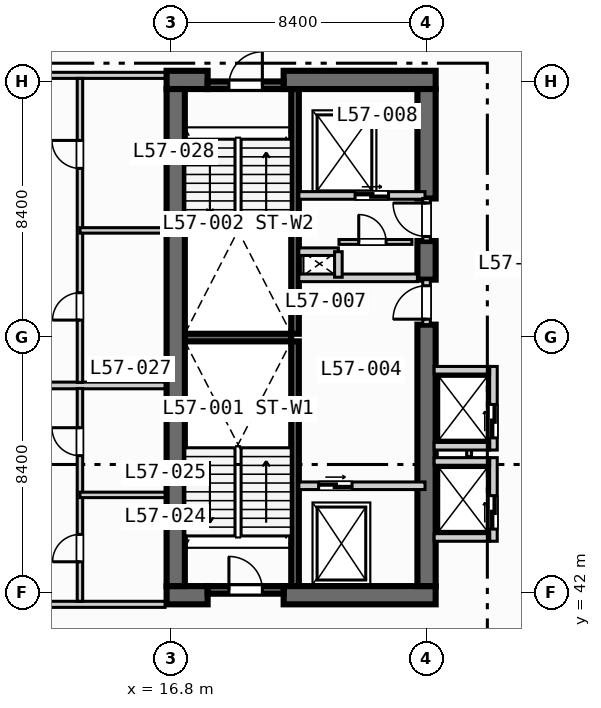
"""IFC4 building model, lengths in metres.
Left out: names, types, materials, properties, quantities, classifications, styles, units other than length and angle.
Written with IfcOpenShell. Run it as: python <this file> out.ifc"""

import sys

from ifc_helpers import new_model, si_unit, direction, frame, frame_2d, origin, place, context, subcontext, project, spatial, rectangle, extrude, element, fill, save


model = new_model("IFC4")
c1 = context("Model", 3, precision=1e-05, world=origin(), true_north=direction((0.0, 1.0)))
c2 = subcontext(c1, "Body", "Model", "MODEL_VIEW")
j1 = project(units=[si_unit("LENGTHUNIT", "METRE"), si_unit("PLANEANGLEUNIT", "RADIAN")], contexts=[c1])
p1 = place(None, origin())
s1 = spatial("IfcSite", under=j1, at=p1, CompositionType="ELEMENT")
p2 = place(p1, origin())
s2 = spatial("IfcBuilding", under=s1, at=p2, CompositionType="ELEMENT")
p3 = place(p2, frame((0.0, 0.0, 234.2)))
s3 = spatial("IfcBuildingStorey", under=s2, at=p3, CompositionType="ELEMENT", Elevation=234.2)
for number, where, z_axis, x_axis in (
    (1, (20.875, 42.2, 0.0), (0.0, 0.0, 1.0), (0.0, 1.0, 0.0)),
    (2, (20.875, 50.5, 0.0), (0.0, 0.0, 1.0), (0.0, 1.0, 0.0)),
):
    element("IfcWall", number, at=place(p3, frame(where, z_axis=z_axis, x_axis=x_axis)), inside=s3, PredefinedType="SOLIDWALL", context=c2, shape_type="SweptSolid", body=[
        extrude(rectangle(XDim=8.05, YDim=0.25, at=frame_2d((4.025, 0.0))), origin(), (0.0, 0.0, 1.0), 3.47),
    ])
p4 = place(p3, frame((17.25, 50.375, 0.0), z_axis=(0.0, 0.0, 1.0), x_axis=(1.0, 0.0, 0.0)))
e3 = element("IfcWall", 3, at=p4, inside=s3, PredefinedType="SOLIDWALL", context=c2, shape_type="SweptSolid", body=[
    extrude(rectangle(XDim=3.5, YDim=0.25, at=frame_2d((1.75, 0.0))), origin(), (0.0, 0.0, 1.0), 3.47),
])
p5 = place(p3, frame((16.65, 41.9, 0.0), z_axis=(0.0, 0.0, 1.0), x_axis=(1.0, 0.0, 0.0)))
e4 = element("IfcWall", 4, at=p5, inside=s3, PredefinedType="SHEAR", context=c2, shape_type="SweptSolid", body=[
    extrude(rectangle(XDim=1.35, YDim=0.6, at=frame_2d((0.675, 0.0))), origin(), (0.0, 0.0, 1.0), 3.47),
])
p6 = place(p3, frame((20.5, 41.9, 0.0), z_axis=(0.0, 0.0, 1.0), x_axis=(1.0, 0.0, 0.0)))
e5 = element("IfcWall", 5, at=p6, inside=s3, PredefinedType="SHEAR", context=c2, shape_type="SweptSolid", body=[
    extrude(rectangle(XDim=5.0, YDim=0.6, at=frame_2d((2.5, 0.0))), origin(), (0.0, 0.0, 1.0), 3.47),
])
p7 = place(p3, frame((16.65, 58.85, 0.0), z_axis=(0.0, 0.0, 1.0), x_axis=(1.0, 0.0, 0.0)))
e6 = element("IfcWall", 6, at=p7, inside=s3, PredefinedType="SHEAR", context=c2, shape_type="SweptSolid", body=[
    extrude(rectangle(XDim=1.35, YDim=0.6, at=frame_2d((0.675, 0.0))), origin(), (0.0, 0.0, 1.0), 3.47),
])
p8 = place(p3, frame((20.5, 58.85, 0.0), z_axis=(0.0, 0.0, 1.0), x_axis=(1.0, 0.0, 0.0)))
e7 = element("IfcWall", 7, at=p8, inside=s3, PredefinedType="SHEAR", context=c2, shape_type="SweptSolid", body=[
    extrude(rectangle(XDim=5.0, YDim=0.6, at=frame_2d((2.5, 0.0))), origin(), (0.0, 0.0, 1.0), 3.47),
])
p9 = place(p3, frame((16.95, 42.2, 0.0), z_axis=(0.0, 0.0, 1.0), x_axis=(0.0, 1.0, 0.0)))
e8 = element("IfcWall", 8, at=p9, inside=s3, PredefinedType="SHEAR", context=c2, shape_type="SweptSolid", body=[
    extrude(rectangle(XDim=16.35, YDim=0.6, at=frame_2d((8.175, 0.0))), origin(), (0.0, 0.0, 1.0), 3.47),
])
p10 = place(p3, frame((25.2, 42.2, 0.0), z_axis=(0.0, 0.0, 1.0), x_axis=(0.0, 1.0, 0.0)))
e9 = element("IfcWall", 9, at=p10, inside=s3, PredefinedType="SHEAR", context=c2, shape_type="SweptSolid", body=[
    extrude(rectangle(XDim=8.6, YDim=0.6, at=frame_2d((4.3, 0.0))), origin(), (0.0, 0.0, 1.0), 3.47),
])
p11 = place(p3, frame((25.2, 52.28, 0.0), z_axis=(0.0, 0.0, 1.0), x_axis=(0.0, 1.0, 0.0)))
e10 = element("IfcWall", 10, at=p11, inside=s3, PredefinedType="SHEAR", context=c2, shape_type="SweptSolid", body=[
    extrude(rectangle(XDim=1.27, YDim=0.6, at=frame_2d((0.635, 0.0))), origin(), (0.0, 0.0, 1.0), 3.47),
])
p12 = place(p3, frame((25.2, 54.95, 0.0), z_axis=(0.0, 0.0, 1.0), x_axis=(0.0, 1.0, 0.0)))
e11 = element("IfcWall", 11, at=p12, inside=s3, PredefinedType="SHEAR", context=c2, shape_type="SweptSolid", body=[
    extrude(rectangle(XDim=3.6, YDim=0.6, at=frame_2d((1.8, 0.0))), origin(), (0.0, 0.0, 1.0), 3.47),
])
p13 = place(p3, frame((18.0, 42.075, 0.0), z_axis=(0.0, 0.0, 1.0), x_axis=(1.0, 0.0, 0.0)))
e12 = element("IfcWall", 12, at=p13, inside=s3, PredefinedType="SOLIDWALL", context=c2, shape_type="SweptSolid", body=[
    extrude(rectangle(XDim=2.5, YDim=0.25, at=frame_2d((1.25, 0.0))), origin(), (0.0, 0.0, 1.0), 3.47),
])
p14 = place(p13, frame((0.7, 0.0, 0.0)))
e13 = element("IfcOpeningElement", 13, at=p14, cuts=e12, PredefinedType="OPENING", context=c2, shape_type="SweptSolid", body=[
    extrude(rectangle(XDim=1.1, YDim=2.15, at=frame_2d((0.55, 1.075))), frame((0.0, 0.135, 0.0), z_axis=(0.0, -1.0, 0.0), x_axis=(1.0, 0.0, 0.0)), (0.0, 0.0, 1.0), 0.27),
])
p15 = place(p3, frame((18.0, 58.675, 0.0), z_axis=(0.0, 0.0, 1.0), x_axis=(1.0, 0.0, 0.0)))
e14 = element("IfcWall", 14, at=p15, inside=s3, PredefinedType="SOLIDWALL", context=c2, shape_type="SweptSolid", body=[
    extrude(rectangle(XDim=2.5, YDim=0.25, at=frame_2d((1.25, 0.0))), origin(), (0.0, 0.0, 1.0), 3.47),
])
p16 = place(p15, frame((0.7, 0.0, 0.0)))
e15 = element("IfcOpeningElement", 15, at=p16, cuts=e14, PredefinedType="OPENING", context=c2, shape_type="SweptSolid", body=[
    extrude(rectangle(XDim=1.1, YDim=2.15, at=frame_2d((0.55, 1.075))), frame((0.0, 0.135, 0.0), z_axis=(0.0, -1.0, 0.0), x_axis=(1.0, 0.0, 0.0)), (0.0, 0.0, 1.0), 0.27),
])
p17 = place(p3, frame((21.0, 45.5, 0.0), z_axis=(0.0, 0.0, 1.0), x_axis=(1.0, 0.0, 0.0)))
e16 = element("IfcWall", 16, at=p17, inside=s3, PredefinedType="SOLIDWALL", context=c2, shape_type="SweptSolid", body=[
    extrude(rectangle(XDim=4.15, YDim=0.25, at=frame_2d((2.075, 0.0))), origin(), (0.0, 0.0, 1.0), 3.47),
])
p18 = place(p17, frame((0.65, 0.0, 0.0)))
e17 = element("IfcOpeningElement", 17, at=p18, cuts=e16, PredefinedType="OPENING", context=c2, shape_type="SweptSolid", body=[
    extrude(rectangle(XDim=1.1, YDim=2.15, at=frame_2d((0.55, 1.075))), frame((0.0, 0.135, 0.0), z_axis=(0.0, -1.0, 0.0), x_axis=(1.0, 0.0, 0.0)), (0.0, 0.0, 1.0), 0.27),
])
p19 = place(p3, frame((25.2, 50.8, 0.0), z_axis=(0.0, 0.0, 1.0), x_axis=(0.0, 1.0, 0.0)))
e18 = element("IfcWall", 18, at=p19, inside=s3, PredefinedType="SOLIDWALL", context=c2, shape_type="SweptSolid", body=[
    extrude(rectangle(XDim=1.48, YDim=0.25, at=frame_2d((0.74, 0.0))), origin(), (0.0, 0.0, 1.0), 3.47),
])
p20 = place(p19, frame((0.18, 0.0, 0.0)))
e19 = element("IfcOpeningElement", 19, at=p20, cuts=e18, PredefinedType="OPENING", context=c2, shape_type="SweptSolid", body=[
    extrude(rectangle(XDim=1.1, YDim=2.15, at=frame_2d((0.55, 1.075))), frame((0.0, 0.135, 0.0), z_axis=(0.0, -1.0, 0.0), x_axis=(1.0, 0.0, 0.0)), (0.0, 0.0, 1.0), 0.27),
])
p21 = place(p3, frame((21.0, 52.34, 0.0), z_axis=(0.0, 0.0, 1.0), x_axis=(1.0, 0.0, 0.0)))
e20 = element("IfcWall", 20, at=p21, inside=s3, PredefinedType="SOLIDWALL", context=c2, shape_type="SweptSolid", body=[
    extrude(rectangle(XDim=3.9, YDim=0.25, at=frame_2d((1.95, 0.0))), origin(), (0.0, 0.0, 1.0), 3.47),
])
p22 = place(p3, frame((21.0, 55.05, 0.0), z_axis=(0.0, 0.0, 1.0), x_axis=(1.0, 0.0, 0.0)))
e21 = element("IfcWall", 21, at=p22, inside=s3, PredefinedType="SOLIDWALL", context=c2, shape_type="SweptSolid", body=[
    extrude(rectangle(XDim=4.15, YDim=0.25, at=frame_2d((2.075, 0.0))), origin(), (0.0, 0.0, 1.0), 3.47),
])
p23 = place(p22, frame((1.85, 0.0, 0.0)))
e22 = element("IfcOpeningElement", 22, at=p23, cuts=e21, PredefinedType="OPENING", context=c2, shape_type="SweptSolid", body=[
    extrude(rectangle(XDim=1.1, YDim=2.15, at=frame_2d((0.55, 1.075))), frame((0.0, 0.135, 0.0), z_axis=(0.0, -1.0, 0.0), x_axis=(1.0, 0.0, 0.0)), (0.0, 0.0, 1.0), 0.27),
])
p24 = place(p3, frame((25.2, 53.55, 0.0), z_axis=(0.0, 0.0, 1.0), x_axis=(0.0, 1.0, 0.0)))
e23 = element("IfcWall", 23, at=p24, inside=s3, PredefinedType="SOLIDWALL", context=c2, shape_type="SweptSolid", body=[
    extrude(rectangle(XDim=1.4, YDim=0.25, at=frame_2d((0.7, 0.0))), origin(), (0.0, 0.0, 1.0), 3.47),
])
p25 = place(p24, frame((0.15, 0.0, 0.0)))
e24 = element("IfcOpeningElement", 24, at=p25, cuts=e23, PredefinedType="OPENING", context=c2, shape_type="SweptSolid", body=[
    extrude(rectangle(XDim=1.1, YDim=2.15, at=frame_2d((0.55, 1.075))), frame((0.0, 0.135, 0.0), z_axis=(0.0, -1.0, 0.0), x_axis=(1.0, 0.0, 0.0)), (0.0, 0.0, 1.0), 0.27),
])
p26 = place(p3, frame((21.0, 53.2, 0.0), z_axis=(0.0, 0.0, 1.0), x_axis=(1.0, 0.0, 0.0)))
e25 = element("IfcWall", 25, at=p26, inside=s3, PredefinedType="SOLIDWALL", context=c2, shape_type="SweptSolid", body=[
    extrude(rectangle(XDim=1.3, YDim=0.25, at=frame_2d((0.65, 0.0))), origin(), (0.0, 0.0, 1.0), 3.47),
])
p27 = place(p3, frame((22.3, 52.36, 0.0), z_axis=(0.0, 0.0, 1.0), x_axis=(0.0, 1.0, 0.0)))
e26 = element("IfcWall", 26, at=p27, inside=s3, PredefinedType="SOLIDWALL", context=c2, shape_type="SweptSolid", body=[
    extrude(rectangle(XDim=0.84, YDim=0.25, at=frame_2d((0.42, 0.0))), origin(), (0.0, 0.0, 1.0), 3.47),
])
p28 = place(p3, frame((22.32, 53.52, 0.0), z_axis=(0.0, 0.0, 1.0), x_axis=(1.0, 0.0, 0.0)))
e27 = element("IfcWall", 27, at=p28, inside=s3, PredefinedType="PARTITIONING", context=c2, shape_type="SweptSolid", body=[
    extrude(rectangle(XDim=2.4, YDim=0.16, at=frame_2d((1.2, 0.0))), origin(), (0.0, 0.0, 1.0), 3.47),
])
p29 = place(p28, frame((0.65, 0.0, 0.0)))
e28 = element("IfcOpeningElement", 28, at=p29, cuts=e27, PredefinedType="OPENING", context=c2, shape_type="SweptSolid", body=[
    extrude(rectangle(XDim=0.9, YDim=2.1, at=frame_2d((0.45, 1.05))), frame((0.0, 0.09, 0.0), z_axis=(0.0, -1.0, 0.0), x_axis=(1.0, 0.0, 0.0)), (0.0, 0.0, 1.0), 0.18),
])
p30 = place(p3, frame((27.4, 43.675, 0.0), z_axis=(0.0, 0.0, 1.0), x_axis=(0.0, 1.0, 0.0)))
e29 = element("IfcWall", 29, at=p30, inside=s3, PredefinedType="SOLIDWALL", context=c2, shape_type="SweptSolid", body=[
    extrude(rectangle(XDim=2.75, YDim=0.25, at=frame_2d((1.375, 0.0))), origin(), (0.0, 0.0, 1.0), 3.47),
])
p31 = place(p30, frame((0.4, 0.0, 0.0)))
e30 = element("IfcOpeningElement", 30, at=p31, cuts=e29, PredefinedType="OPENING", context=c2, shape_type="SweptSolid", body=[
    extrude(rectangle(XDim=1.1, YDim=2.15, at=frame_2d((0.55, 1.075))), frame((0.0, 0.135, 0.0), z_axis=(0.0, -1.0, 0.0), x_axis=(1.0, 0.0, 0.0)), (0.0, 0.0, 1.0), 0.27),
])
for number, where, z_axis, x_axis in (
    (31, (25.45, 43.8, 0.0), (0.0, 0.0, 1.0), (1.0, 0.0, 0.0)),
    (32, (25.45, 46.3, 0.0), (0.0, 0.0, 1.0), (1.0, 0.0, 0.0)),
):
    element("IfcWall", number, at=place(p3, frame(where, z_axis=z_axis, x_axis=x_axis)), inside=s3, PredefinedType="SOLIDWALL", context=c2, shape_type="SweptSolid", body=[
        extrude(rectangle(XDim=1.825, YDim=0.25, at=frame_2d((0.913, 0.0))), origin(), (0.0, 0.0, 1.0), 3.47),
    ])
p32 = place(p3, frame((26.6, 46.46, 0.0), z_axis=(0.0, 0.0, 1.0), x_axis=(0.0, 1.0, 0.0)))
e33 = element("IfcWall", 33, at=p32, inside=s3, PredefinedType="PARTITIONING", context=c2, shape_type="SweptSolid", body=[
    extrude(rectangle(XDim=0.88, YDim=0.16, at=frame_2d((0.44, 0.0))), origin(), (0.0, 0.0, 1.0), 3.47),
])
p33 = place(p3, frame((27.4, 46.675, 0.0), z_axis=(0.0, 0.0, 1.0), x_axis=(0.0, 1.0, 0.0)))
e34 = element("IfcWall", 34, at=p33, inside=s3, PredefinedType="SOLIDWALL", context=c2, shape_type="SweptSolid", body=[
    extrude(rectangle(XDim=2.75, YDim=0.25, at=frame_2d((1.375, 0.0))), origin(), (0.0, 0.0, 1.0), 3.47),
])
p34 = place(p33, frame((0.4, 0.0, 0.0)))
e35 = element("IfcOpeningElement", 35, at=p34, cuts=e34, PredefinedType="OPENING", context=c2, shape_type="SweptSolid", body=[
    extrude(rectangle(XDim=1.1, YDim=2.15, at=frame_2d((0.55, 1.075))), frame((0.0, 0.135, 0.0), z_axis=(0.0, -1.0, 0.0), x_axis=(1.0, 0.0, 0.0)), (0.0, 0.0, 1.0), 0.27),
])
for number, where, z_axis, x_axis in (
    (36, (25.45, 46.8, 0.0), (0.0, 0.0, 1.0), (1.0, 0.0, 0.0)),
    (37, (25.45, 49.3, 0.0), (0.0, 0.0, 1.0), (1.0, 0.0, 0.0)),
):
    element("IfcWall", number, at=place(p3, frame(where, z_axis=z_axis, x_axis=x_axis)), inside=s3, PredefinedType="SOLIDWALL", context=c2, shape_type="SweptSolid", body=[
        extrude(rectangle(XDim=1.825, YDim=0.25, at=frame_2d((0.913, 0.0))), origin(), (0.0, 0.0, 1.0), 3.47),
    ])
p35 = place(p3, frame((8.65, 41.6, 0.0), z_axis=(0.0, 0.0, 1.0), x_axis=(1.0, 0.0, 0.0)))
e38 = element("IfcWall", 38, at=p35, inside=s3, PredefinedType="PARTITIONING", context=c2, shape_type="SweptSolid", body=[
    extrude(rectangle(XDim=7.95, YDim=0.2, at=frame_2d((3.975, 0.0))), origin(), (0.0, 0.0, 1.0), 3.47),
])
p36 = place(p35, frame((2.0, 0.0, 0.0)))
e39 = element("IfcOpeningElement", 39, at=p36, cuts=e38, PredefinedType="OPENING", context=c2, shape_type="SweptSolid", body=[
    extrude(rectangle(XDim=1.0, YDim=2.15, at=frame_2d((0.5, 1.075))), frame((0.0, 0.11, 0.0), z_axis=(0.0, -1.0, 0.0), x_axis=(1.0, 0.0, 0.0)), (0.0, 0.0, 1.0), 0.22),
])
p37 = place(p3, frame((8.65, 59.0, 0.0), z_axis=(0.0, 0.0, 1.0), x_axis=(1.0, 0.0, 0.0)))
e40 = element("IfcWall", 40, at=p37, inside=s3, PredefinedType="PARTITIONING", context=c2, shape_type="SweptSolid", body=[
    extrude(rectangle(XDim=7.95, YDim=0.2, at=frame_2d((3.975, 0.0))), origin(), (0.0, 0.0, 1.0), 3.116),
])
p38 = place(p37, frame((2.0, 0.0, 0.0)))
e41 = element("IfcOpeningElement", 41, at=p38, cuts=e40, PredefinedType="OPENING", context=c2, shape_type="SweptSolid", body=[
    extrude(rectangle(XDim=1.0, YDim=2.15, at=frame_2d((0.5, 1.075))), frame((0.0, 0.11, 0.0), z_axis=(0.0, -1.0, 0.0), x_axis=(1.0, 0.0, 0.0)), (0.0, 0.0, 1.0), 0.22),
])
p39 = place(p3, frame((8.65, 48.8, 0.0), z_axis=(0.0, 0.0, 1.0), x_axis=(1.0, 0.0, 0.0)))
e42 = element("IfcWall", 42, at=p39, inside=s3, PredefinedType="PARTITIONING", context=c2, shape_type="SweptSolid", body=[
    extrude(rectangle(XDim=7.95, YDim=0.22, at=frame_2d((3.975, 0.0))), origin(), (0.0, 0.0, 1.0), 3.47),
])
p40 = place(p3, frame((13.8, 41.7, 0.0), z_axis=(0.0, 0.0, 1.0), x_axis=(0.0, 1.0, 0.0)))
e43 = element("IfcWall", 43, at=p40, inside=s3, PredefinedType="PLUMBINGWALL", context=c2, shape_type="SweptSolid", body=[
    extrude(rectangle(XDim=7.0, YDim=0.18, at=frame_2d((3.5, 0.0))), origin(), (0.0, 0.0, 1.0), 3.47),
])
p41 = place(p40, frame((1.3, 0.0, 0.0)))
e44 = element("IfcOpeningElement", 44, at=p41, cuts=e43, PredefinedType="OPENING", context=c2, shape_type="SweptSolid", body=[
    extrude(rectangle(XDim=0.9, YDim=2.1, at=frame_2d((0.45, 1.05))), frame((0.0, 0.1, 0.0), z_axis=(0.0, -1.0, 0.0), x_axis=(1.0, 0.0, 0.0)), (0.0, 0.0, 1.0), 0.2),
])
p42 = place(p40, frame((4.79, 0.0, 0.0)))
e45 = element("IfcOpeningElement", 45, at=p42, cuts=e43, PredefinedType="OPENING", context=c2, shape_type="SweptSolid", body=[
    extrude(rectangle(XDim=0.92, YDim=2.1, at=frame_2d((0.46, 1.05))), frame((0.0, 0.1, 0.0), z_axis=(0.0, -1.0, 0.0), x_axis=(1.0, 0.0, 0.0)), (0.0, 0.0, 1.0), 0.2),
])
p43 = place(p3, frame((13.8, 45.2, 0.0), z_axis=(0.0, 0.0, 1.0), x_axis=(1.0, 0.0, 0.0)))
e46 = element("IfcWall", 46, at=p43, inside=s3, PredefinedType="PLUMBINGWALL", context=c2, shape_type="SweptSolid", body=[
    extrude(rectangle(XDim=2.8, YDim=0.18, at=frame_2d((1.4, 0.0))), origin(), (0.0, 0.0, 1.0), 3.47),
])
p44 = place(p3, frame((13.8, 48.9, 0.0), z_axis=(0.0, 0.0, 1.0), x_axis=(0.0, 1.0, 0.0)))
e47 = element("IfcWall", 47, at=p44, inside=s3, PredefinedType="PLUMBINGWALL", context=c2, shape_type="SweptSolid", body=[
    extrude(rectangle(XDim=10.0, YDim=0.18, at=frame_2d((5.0, 0.0))), origin(), (0.0, 0.0, 1.0), 3.47),
])
p45 = place(p44, frame((2.05, 0.0, 0.0)))
e48 = element("IfcOpeningElement", 48, at=p45, cuts=e47, PredefinedType="OPENING", context=c2, shape_type="SweptSolid", body=[
    extrude(rectangle(XDim=0.9, YDim=2.1, at=frame_2d((0.45, 1.05))), frame((0.0, 0.1, 0.0), z_axis=(0.0, -1.0, 0.0), x_axis=(1.0, 0.0, 0.0)), (0.0, 0.0, 1.0), 0.2),
])
p46 = place(p44, frame((7.04, 0.0, 0.0)))
e49 = element("IfcOpeningElement", 49, at=p46, cuts=e47, PredefinedType="OPENING", context=c2, shape_type="SweptSolid", body=[
    extrude(rectangle(XDim=0.92, YDim=2.1, at=frame_2d((0.46, 1.05))), frame((0.0, 0.1, 0.0), z_axis=(0.0, -1.0, 0.0), x_axis=(1.0, 0.0, 0.0)), (0.0, 0.0, 1.0), 0.2),
])
p47 = place(p3, frame((13.8, 53.9, 0.0), z_axis=(0.0, 0.0, 1.0), x_axis=(1.0, 0.0, 0.0)))
e50 = element("IfcWall", 50, at=p47, inside=s3, PredefinedType="PLUMBINGWALL", context=c2, shape_type="SweptSolid", body=[
    extrude(rectangle(XDim=2.8, YDim=0.18, at=frame_2d((1.4, 0.0))), origin(), (0.0, 0.0, 1.0), 3.47),
])
p48 = place(p14, origin())
e51 = element("IfcDoor", 51, at=p48, inside=s3, OperationType="SINGLE_SWING_LEFT", PredefinedType="DOOR", context=c2, shape_type="SweptSolid", body=[
    extrude(rectangle(XDim=1.1, YDim=2.15, at=frame_2d((0.55, 1.075))), frame((0.0, 0.025, 0.0), z_axis=(0.0, -1.0, 0.0), x_axis=(1.0, 0.0, 0.0)), (0.0, 0.0, 1.0), 0.05),
])
fill(e13, e51)
p49 = place(p16, origin())
e52 = element("IfcDoor", 52, at=p49, inside=s3, OperationType="SINGLE_SWING_RIGHT", PredefinedType="DOOR", context=c2, shape_type="SweptSolid", body=[
    extrude(rectangle(XDim=1.1, YDim=2.15, at=frame_2d((0.55, 1.075))), frame((0.0, 0.025, 0.0), z_axis=(0.0, -1.0, 0.0), x_axis=(1.0, 0.0, 0.0)), (0.0, 0.0, 1.0), 0.05),
])
fill(e15, e52)
p50 = place(p18, origin())
e53 = element("IfcDoor", 53, at=p50, inside=s3, OperationType="SLIDING_TO_LEFT", PredefinedType="DOOR", context=c2, shape_type="SweptSolid", body=[
    extrude(rectangle(XDim=1.1, YDim=2.15, at=frame_2d((0.55, 1.075))), frame((0.0, 0.025, 0.0), z_axis=(0.0, -1.0, 0.0), x_axis=(1.0, 0.0, 0.0)), (0.0, 0.0, 1.0), 0.05),
])
fill(e17, e53)
p51 = place(p20, origin())
e54 = element("IfcDoor", 54, at=p51, inside=s3, OperationType="SINGLE_SWING_LEFT", PredefinedType="DOOR", context=c2, shape_type="SweptSolid", body=[
    extrude(rectangle(XDim=1.1, YDim=2.15, at=frame_2d((0.55, 1.075))), frame((0.0, 0.025, 0.0), z_axis=(0.0, -1.0, 0.0), x_axis=(1.0, 0.0, 0.0)), (0.0, 0.0, 1.0), 0.05),
])
fill(e19, e54)
p52 = place(p23, origin())
e55 = element("IfcDoor", 55, at=p52, inside=s3, OperationType="SLIDING_TO_LEFT", PredefinedType="DOOR", context=c2, shape_type="SweptSolid", body=[
    extrude(rectangle(XDim=1.1, YDim=2.15, at=frame_2d((0.55, 1.075))), frame((0.0, 0.025, 0.0), z_axis=(0.0, -1.0, 0.0), x_axis=(1.0, 0.0, 0.0)), (0.0, 0.0, 1.0), 0.05),
])
fill(e22, e55)
p53 = place(p25, origin())
e56 = element("IfcDoor", 56, at=p53, inside=s3, OperationType="SINGLE_SWING_RIGHT", PredefinedType="DOOR", context=c2, shape_type="SweptSolid", body=[
    extrude(rectangle(XDim=1.1, YDim=2.15, at=frame_2d((0.55, 1.075))), frame((0.0, 0.025, 0.0), z_axis=(0.0, -1.0, 0.0), x_axis=(1.0, 0.0, 0.0)), (0.0, 0.0, 1.0), 0.05),
])
fill(e24, e56)
p54 = place(p29, origin())
e57 = element("IfcDoor", 57, at=p54, inside=s3, OperationType="SINGLE_SWING_LEFT", PredefinedType="DOOR", context=c2, shape_type="SweptSolid", body=[
    extrude(rectangle(XDim=0.9, YDim=2.1, at=frame_2d((0.45, 1.05))), frame((0.0, 0.025, 0.0), z_axis=(0.0, -1.0, 0.0), x_axis=(1.0, 0.0, 0.0)), (0.0, 0.0, 1.0), 0.05),
])
fill(e28, e57)
p55 = place(p31, origin())
e58 = element("IfcDoor", 58, at=p55, inside=s3, OperationType="SLIDING_TO_LEFT", PredefinedType="DOOR", context=c2, shape_type="SweptSolid", body=[
    extrude(rectangle(XDim=1.1, YDim=2.15, at=frame_2d((0.55, 1.075))), frame((0.0, 0.025, 0.0), z_axis=(0.0, -1.0, 0.0), x_axis=(1.0, 0.0, 0.0)), (0.0, 0.0, 1.0), 0.05),
])
fill(e30, e58)
p56 = place(p34, origin())
e59 = element("IfcDoor", 59, at=p56, inside=s3, OperationType="SLIDING_TO_LEFT", PredefinedType="DOOR", context=c2, shape_type="SweptSolid", body=[
    extrude(rectangle(XDim=1.1, YDim=2.15, at=frame_2d((0.55, 1.075))), frame((0.0, 0.025, 0.0), z_axis=(0.0, -1.0, 0.0), x_axis=(1.0, 0.0, 0.0)), (0.0, 0.0, 1.0), 0.05),
])
fill(e35, e59)
p57 = place(p41, origin())
e60 = element("IfcDoor", 60, at=p57, inside=s3, OperationType="SINGLE_SWING_LEFT", PredefinedType="DOOR", context=c2, shape_type="SweptSolid", body=[
    extrude(rectangle(XDim=0.9, YDim=2.1, at=frame_2d((0.45, 1.05))), frame((0.0, 0.025, 0.0), z_axis=(0.0, -1.0, 0.0), x_axis=(1.0, 0.0, 0.0)), (0.0, 0.0, 1.0), 0.05),
])
fill(e44, e60)
p58 = place(p42, origin())
e61 = element("IfcDoor", 61, at=p58, inside=s3, OperationType="SINGLE_SWING_RIGHT", PredefinedType="DOOR", context=c2, shape_type="SweptSolid", body=[
    extrude(rectangle(XDim=0.92, YDim=2.1, at=frame_2d((0.46, 1.05))), frame((0.0, 0.025, 0.0), z_axis=(0.0, -1.0, 0.0), x_axis=(1.0, 0.0, 0.0)), (0.0, 0.0, 1.0), 0.05),
])
fill(e45, e61)
p59 = place(p45, origin())
e62 = element("IfcDoor", 62, at=p59, inside=s3, OperationType="SINGLE_SWING_LEFT", PredefinedType="DOOR", context=c2, shape_type="SweptSolid", body=[
    extrude(rectangle(XDim=0.9, YDim=2.1, at=frame_2d((0.45, 1.05))), frame((0.0, 0.025, 0.0), z_axis=(0.0, -1.0, 0.0), x_axis=(1.0, 0.0, 0.0)), (0.0, 0.0, 1.0), 0.05),
])
fill(e48, e62)
p60 = place(p46, origin())
e63 = element("IfcDoor", 63, at=p60, inside=s3, OperationType="SINGLE_SWING_RIGHT", PredefinedType="DOOR", context=c2, shape_type="SweptSolid", body=[
    extrude(rectangle(XDim=0.92, YDim=2.1, at=frame_2d((0.46, 1.05))), frame((0.0, 0.025, 0.0), z_axis=(0.0, -1.0, 0.0), x_axis=(1.0, 0.0, 0.0)), (0.0, 0.0, 1.0), 0.05),
])
fill(e49, e63)
save(model, sys.argv[1])
